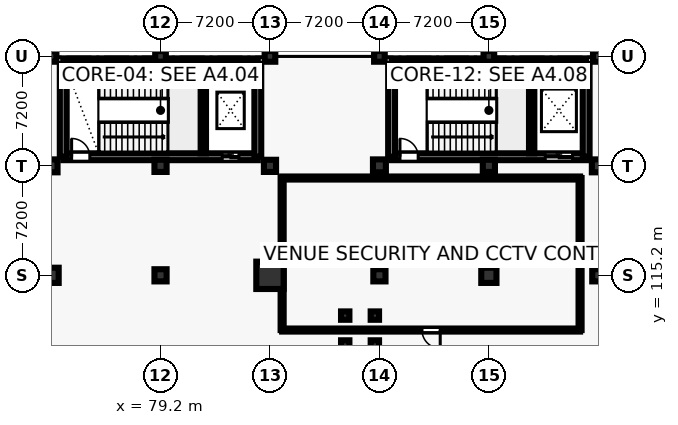
"""IFC4 building model, lengths in metres.
Left out: names, types, materials, properties, quantities, classifications, styles, units other than length and angle.
Written with IfcOpenShell. Run it as: python <this file> out.ifc"""

import sys

from ifc_helpers import new_model, si_unit, direction, frame, frame_2d, origin, origin_2d, place, context, subcontext, project, spatial, rectangle, circle, extrude, element, fill, save


model = new_model("IFC4")
c1 = context("Model", 3, precision=1e-05, world=origin(), true_north=direction((0.0, 1.0)))
c2 = subcontext(c1, "Body", "Model", "MODEL_VIEW")
j1 = project(units=[si_unit("LENGTHUNIT", "METRE"), si_unit("PLANEANGLEUNIT", "RADIAN")], contexts=[c1])
p1 = place(None, origin())
s1 = spatial("IfcSite", under=j1, at=p1, CompositionType="ELEMENT")
p2 = place(p1, origin())
s2 = spatial("IfcBuilding", under=s1, at=p2, CompositionType="ELEMENT")
p3 = place(p2, frame((0.0, 0.0, 5.4)))
s3 = spatial("IfcBuildingStorey", under=s2, at=p3, CompositionType="ELEMENT", Elevation=5.4)
p4 = place(p3, frame((72.0, 115.2, 0.0), z_axis=(0.0, 0.0, 1.0), x_axis=(1.0, 0.0, 0.0)))
e1 = element("IfcColumn", 1, at=p4, inside=s3, PredefinedType="COLUMN", context=c2, shape_type="SweptSolid", body=[
    extrude(circle(Radius=0.5, at=origin_2d()), origin(), (0.0, 0.0, 1.0), 4.2),
])
p5 = place(p3, frame((72.0, 122.4, 0.0), z_axis=(0.0, 0.0, 1.0), x_axis=(1.0, 0.0, 0.0)))
e2 = element("IfcColumn", 2, at=p5, inside=s3, PredefinedType="COLUMN", context=c2, shape_type="SweptSolid", body=[
    extrude(rectangle(XDim=0.85, YDim=0.85, at=origin_2d()), origin(), (0.0, 0.0, 1.0), 4.2),
])
p6 = place(p3, frame((72.0, 129.6, 0.0), z_axis=(0.0, 0.0, 1.0), x_axis=(1.0, 0.0, 0.0)))
e3 = element("IfcColumn", 3, at=p6, inside=s3, PredefinedType="COLUMN", context=c2, shape_type="SweptSolid", body=[
    extrude(rectangle(XDim=0.7, YDim=0.7, at=origin_2d()), origin(), (0.0, 0.0, 1.0), 4.2),
])
p7 = place(p3, frame((79.2, 115.2, 0.0), z_axis=(0.0, 0.0, 1.0), x_axis=(1.0, 0.0, 0.0)))
e4 = element("IfcColumn", 4, at=p7, inside=s3, PredefinedType="COLUMN", context=c2, shape_type="SweptSolid", body=[
    extrude(rectangle(XDim=0.8, YDim=0.8, at=origin_2d()), origin(), (0.0, 0.0, 1.0), 4.2),
])
p8 = place(p3, frame((79.2, 122.4, 0.0), z_axis=(0.0, 0.0, 1.0), x_axis=(1.0, 0.0, 0.0)))
e5 = element("IfcColumn", 5, at=p8, inside=s3, PredefinedType="COLUMN", context=c2, shape_type="SweptSolid", body=[
    extrude(circle(Radius=0.4, at=origin_2d()), origin(), (0.0, 0.0, 1.0), 4.2),
])
p9 = place(p3, frame((79.2, 129.6, 0.0), z_axis=(0.0, 0.0, 1.0), x_axis=(1.0, 0.0, 0.0)))
e6 = element("IfcColumn", 6, at=p9, inside=s3, PredefinedType="COLUMN", context=c2, shape_type="SweptSolid", body=[
    extrude(rectangle(XDim=0.7, YDim=0.7, at=origin_2d()), origin(), (0.0, 0.0, 1.0), 4.2),
])
p10 = place(p3, frame((86.4, 115.2, 0.0), z_axis=(0.0, 0.0, 1.0), x_axis=(1.0, 0.0, 0.0)))
e7 = element("IfcColumn", 7, at=p10, inside=s3, PredefinedType="COLUMN", context=c2, shape_type="SweptSolid", body=[
    extrude(circle(Radius=0.9, at=origin_2d()), origin(), (0.0, 0.0, 1.0), 4.2),
])
p11 = place(p3, frame((86.4, 122.4, 0.0), z_axis=(0.0, 0.0, 1.0), x_axis=(1.0, 0.0, 0.0)))
e8 = element("IfcColumn", 8, at=p11, inside=s3, PredefinedType="COLUMN", context=c2, shape_type="SweptSolid", body=[
    extrude(rectangle(XDim=0.8, YDim=0.8, at=origin_2d()), origin(), (0.0, 0.0, 1.0), 4.2),
])
p12 = place(p3, frame((86.4, 129.6, 0.0), z_axis=(0.0, 0.0, 1.0), x_axis=(1.0, 0.0, 0.0)))
e9 = element("IfcColumn", 9, at=p12, inside=s3, PredefinedType="COLUMN", context=c2, shape_type="SweptSolid", body=[
    extrude(rectangle(XDim=0.7, YDim=0.7, at=origin_2d()), origin(), (0.0, 0.0, 1.0), 4.2),
])
p13 = place(p3, frame((93.6, 115.2, 0.0), z_axis=(0.0, 0.0, 1.0), x_axis=(1.0, 0.0, 0.0)))
e10 = element("IfcColumn", 10, at=p13, inside=s3, PredefinedType="COLUMN", context=c2, shape_type="SweptSolid", body=[
    extrude(circle(Radius=0.4, at=origin_2d()), origin(), (0.0, 0.0, 1.0), 4.2),
])
p14 = place(p3, frame((93.6, 122.4, 0.0), z_axis=(0.0, 0.0, 1.0), x_axis=(1.0, 0.0, 0.0)))
e11 = element("IfcColumn", 11, at=p14, inside=s3, PredefinedType="COLUMN", context=c2, shape_type="SweptSolid", body=[
    extrude(rectangle(XDim=0.85, YDim=0.85, at=origin_2d()), origin(), (0.0, 0.0, 1.0), 4.2),
])
p15 = place(p3, frame((93.6, 129.6, 0.0), z_axis=(0.0, 0.0, 1.0), x_axis=(1.0, 0.0, 0.0)))
e12 = element("IfcColumn", 12, at=p15, inside=s3, PredefinedType="COLUMN", context=c2, shape_type="SweptSolid", body=[
    extrude(rectangle(XDim=0.7, YDim=0.7, at=origin_2d()), origin(), (0.0, 0.0, 1.0), 4.2),
])
p16 = place(p3, frame((100.8, 115.2, 0.0), z_axis=(0.0, 0.0, 1.0), x_axis=(1.0, 0.0, 0.0)))
e13 = element("IfcColumn", 13, at=p16, inside=s3, PredefinedType="COLUMN", context=c2, shape_type="SweptSolid", body=[
    extrude(circle(Radius=0.5, at=origin_2d()), origin(), (0.0, 0.0, 1.0), 4.2),
])
p17 = place(p3, frame((100.8, 122.4, 0.0), z_axis=(0.0, 0.0, 1.0), x_axis=(1.0, 0.0, 0.0)))
e14 = element("IfcColumn", 14, at=p17, inside=s3, PredefinedType="COLUMN", context=c2, shape_type="SweptSolid", body=[
    extrude(circle(Radius=0.4, at=origin_2d()), origin(), (0.0, 0.0, 1.0), 4.2),
])
p18 = place(p3, frame((100.8, 129.6, 0.0), z_axis=(0.0, 0.0, 1.0), x_axis=(1.0, 0.0, 0.0)))
e15 = element("IfcColumn", 15, at=p18, inside=s3, PredefinedType="COLUMN", context=c2, shape_type="SweptSolid", body=[
    extrude(rectangle(XDim=0.7, YDim=0.7, at=origin_2d()), origin(), (0.0, 0.0, 1.0), 4.2),
])
p19 = place(p3, frame((108.0, 115.2, 0.0), z_axis=(0.0, 0.0, 1.0), x_axis=(1.0, 0.0, 0.0)))
e16 = element("IfcColumn", 16, at=p19, inside=s3, PredefinedType="COLUMN", context=c2, shape_type="SweptSolid", body=[
    extrude(circle(Radius=0.4, at=origin_2d()), origin(), (0.0, 0.0, 1.0), 4.2),
])
p20 = place(p3, frame((108.0, 122.4, 0.0), z_axis=(0.0, 0.0, 1.0), x_axis=(1.0, 0.0, 0.0)))
e17 = element("IfcColumn", 17, at=p20, inside=s3, PredefinedType="COLUMN", context=c2, shape_type="SweptSolid", body=[
    extrude(rectangle(XDim=0.85, YDim=0.85, at=origin_2d()), origin(), (0.0, 0.0, 1.0), 4.2),
])
p21 = place(p3, frame((108.0, 129.6, 0.0), z_axis=(0.0, 0.0, 1.0), x_axis=(1.0, 0.0, 0.0)))
e18 = element("IfcColumn", 18, at=p21, inside=s3, PredefinedType="COLUMN", context=c2, shape_type="SweptSolid", body=[
    extrude(rectangle(XDim=0.7, YDim=0.7, at=origin_2d()), origin(), (0.0, 0.0, 1.0), 4.2),
])
p22 = place(p3, frame((72.8, 123.0, 0.0), z_axis=(0.0, 0.0, 1.0), x_axis=(1.0, 0.0, 0.0)))
e19 = element("IfcWall", 19, at=p22, inside=s3, PredefinedType="SHEAR", context=c2, shape_type="SweptSolid", body=[
    extrude(rectangle(XDim=12.8, YDim=0.45, at=frame_2d((6.4, 0.0))), origin(), (0.0, 0.0, 1.0), 3.92),
])
p23 = place(p22, frame((0.55, 0.0, 0.0)))
e20 = element("IfcOpeningElement", 20, at=p23, cuts=e19, PredefinedType="OPENING", context=c2, shape_type="SweptSolid", body=[
    extrude(rectangle(XDim=1.2, YDim=2.25, at=frame_2d((0.6, 1.125))), frame((0.0, 0.235, 0.0), z_axis=(0.0, -1.0, 0.0), x_axis=(1.0, 0.0, 0.0)), (0.0, 0.0, 1.0), 0.47),
])
p24 = place(p22, frame((10.458, 0.0, 0.0)))
e21 = element("IfcOpeningElement", 21, at=p24, cuts=e19, PredefinedType="OPENING", context=c2, shape_type="SweptSolid", body=[
    extrude(rectangle(XDim=1.1, YDim=2.2, at=frame_2d((0.55, 1.1))), frame((0.0, 0.235, 0.0), z_axis=(0.0, -1.0, 0.0), x_axis=(1.0, 0.0, 0.0)), (0.0, 0.0, 1.0), 0.47),
])
p25 = place(p3, frame((72.8, 129.1, 0.0), z_axis=(0.0, 0.0, 1.0), x_axis=(1.0, 0.0, 0.0)))
e22 = element("IfcWall", 22, at=p25, inside=s3, PredefinedType="SHEAR", context=c2, shape_type="SweptSolid", body=[
    extrude(rectangle(XDim=12.8, YDim=0.45, at=frame_2d((6.4, 0.0))), origin(), (0.0, 0.0, 1.0), 3.92),
])
for number, where, z_axis, x_axis in (
    (23, (72.8, 123.0, 0.0), (0.0, 0.0, 1.0), (0.0, 1.0, 0.0)),
    (24, (85.6, 123.0, 0.0), (0.0, 0.0, 1.0), (0.0, 1.0, 0.0)),
):
    element("IfcWall", number, at=place(p3, frame(where, z_axis=z_axis, x_axis=x_axis)), inside=s3, PredefinedType="SHEAR", context=c2, shape_type="SweptSolid", body=[
        extrude(rectangle(XDim=6.1, YDim=0.45, at=frame_2d((3.05, 0.0))), origin(), (0.0, 0.0, 1.0), 3.92),
    ])
p26 = place(p3, frame((82.016, 123.225, 0.0), z_axis=(0.0, 0.0, 1.0), x_axis=(0.0, 1.0, 0.0)))
e25 = element("IfcWall", 25, at=p26, inside=s3, PredefinedType="SHEAR", context=c2, shape_type="SweptSolid", body=[
    extrude(rectangle(XDim=5.65, YDim=0.35, at=frame_2d((2.825, 0.0))), origin(), (0.0, 0.0, 1.0), 3.92),
])
p27 = place(p3, frame((94.4, 123.0, 0.0), z_axis=(0.0, 0.0, 1.0), x_axis=(1.0, 0.0, 0.0)))
e26 = element("IfcWall", 26, at=p27, inside=s3, PredefinedType="SHEAR", context=c2, shape_type="SweptSolid", body=[
    extrude(rectangle(XDim=12.8, YDim=0.45, at=frame_2d((6.4, 0.0))), origin(), (0.0, 0.0, 1.0), 3.92),
])
p28 = place(p27, frame((0.55, 0.0, 0.0)))
e27 = element("IfcOpeningElement", 27, at=p28, cuts=e26, PredefinedType="OPENING", context=c2, shape_type="SweptSolid", body=[
    extrude(rectangle(XDim=1.2, YDim=2.25, at=frame_2d((0.6, 1.125))), frame((0.0, 0.235, 0.0), z_axis=(0.0, -1.0, 0.0), x_axis=(1.0, 0.0, 0.0)), (0.0, 0.0, 1.0), 0.47),
])
p29 = place(p27, frame((10.108, 0.0, 0.0)))
e28 = element("IfcOpeningElement", 28, at=p29, cuts=e26, PredefinedType="OPENING", context=c2, shape_type="SweptSolid", body=[
    extrude(rectangle(XDim=1.8, YDim=2.4, at=frame_2d((0.9, 1.2))), frame((0.0, 0.235, 0.0), z_axis=(0.0, -1.0, 0.0), x_axis=(1.0, 0.0, 0.0)), (0.0, 0.0, 1.0), 0.47),
])
p30 = place(p3, frame((94.4, 129.1, 0.0), z_axis=(0.0, 0.0, 1.0), x_axis=(1.0, 0.0, 0.0)))
e29 = element("IfcWall", 29, at=p30, inside=s3, PredefinedType="SHEAR", context=c2, shape_type="SweptSolid", body=[
    extrude(rectangle(XDim=12.8, YDim=0.45, at=frame_2d((6.4, 0.0))), origin(), (0.0, 0.0, 1.0), 3.92),
])
for number, where, z_axis, x_axis in (
    (30, (94.4, 123.0, 0.0), (0.0, 0.0, 1.0), (0.0, 1.0, 0.0)),
    (31, (107.2, 123.0, 0.0), (0.0, 0.0, 1.0), (0.0, 1.0, 0.0)),
):
    element("IfcWall", number, at=place(p3, frame(where, z_axis=z_axis, x_axis=x_axis)), inside=s3, PredefinedType="SHEAR", context=c2, shape_type="SweptSolid", body=[
        extrude(rectangle(XDim=6.1, YDim=0.45, at=frame_2d((3.05, 0.0))), origin(), (0.0, 0.0, 1.0), 3.92),
    ])
p31 = place(p3, frame((103.616, 123.225, 0.0), z_axis=(0.0, 0.0, 1.0), x_axis=(0.0, 1.0, 0.0)))
e32 = element("IfcWall", 32, at=p31, inside=s3, PredefinedType="SHEAR", context=c2, shape_type="SweptSolid", body=[
    extrude(rectangle(XDim=5.65, YDim=0.35, at=frame_2d((2.825, 0.0))), origin(), (0.0, 0.0, 1.0), 3.92),
])
for number, where, z_axis, x_axis in (
    (33, (91.35, 110.65, 0.0), (0.0, 0.0, 1.0), (1.0, 0.0, 0.0)),
    (34, (93.3, 110.65, 0.0), (0.0, 0.0, 1.0), (1.0, 0.0, 0.0)),
    (35, (91.35, 112.55, 0.0), (0.0, 0.0, 1.0), (1.0, 0.0, 0.0)),
    (36, (93.3, 112.55, 0.0), (0.0, 0.0, 1.0), (1.0, 0.0, 0.0)),
):
    element("IfcColumn", number, at=place(p3, frame(where, z_axis=z_axis, x_axis=x_axis)), inside=s3, PredefinedType="COLUMN", context=c2, shape_type="SweptSolid", body=[
        extrude(rectangle(XDim=0.55, YDim=0.55, at=origin_2d()), origin(), (0.0, 0.0, 1.0), 4.2),
    ])
p32 = place(p3, frame((87.2, 111.6, 0.0), z_axis=(0.0, 0.0, 1.0), x_axis=(1.0, 0.0, 0.0)))
e37 = element("IfcWall", 37, at=p32, inside=s3, PredefinedType="PARTITIONING", context=c2, shape_type="SweptSolid", body=[
    extrude(rectangle(XDim=19.6, YDim=0.2, at=frame_2d((9.8, 0.0))), origin(), (0.0, 0.0, 1.0), 2.98),
])
p33 = place(p32, frame((9.2, 0.0, 0.0)))
e38 = element("IfcOpeningElement", 38, at=p33, cuts=e37, PredefinedType="OPENING", context=c2, shape_type="SweptSolid", body=[
    extrude(rectangle(XDim=1.2, YDim=2.25, at=frame_2d((0.6, 1.125))), frame((0.0, 0.11, 0.0), z_axis=(0.0, -1.0, 0.0), x_axis=(1.0, 0.0, 0.0)), (0.0, 0.0, 1.0), 0.22),
])
p34 = place(p3, frame((106.8, 111.6, 0.0), z_axis=(0.0, 0.0, 1.0), x_axis=(0.0, 1.0, 0.0)))
e39 = element("IfcWall", 39, at=p34, inside=s3, PredefinedType="PARTITIONING", context=c2, shape_type="SweptSolid", body=[
    extrude(rectangle(XDim=10.0, YDim=0.2, at=frame_2d((5.0, 0.0))), origin(), (0.0, 0.0, 1.0), 2.98),
])
p35 = place(p3, frame((106.8, 121.6, 0.0), z_axis=(0.0, 0.0, 1.0), x_axis=(-1.0, 0.0, 0.0)))
e40 = element("IfcWall", 40, at=p35, inside=s3, PredefinedType="PARTITIONING", context=c2, shape_type="SweptSolid", body=[
    extrude(rectangle(XDim=19.6, YDim=0.2, at=frame_2d((9.8, 0.0))), origin(), (0.0, 0.0, 1.0), 2.98),
])
p36 = place(p3, frame((87.2, 121.6, 0.0), z_axis=(0.0, 0.0, 1.0), x_axis=(0.0, -1.0, 0.0)))
e41 = element("IfcWall", 41, at=p36, inside=s3, PredefinedType="PARTITIONING", context=c2, shape_type="SweptSolid", body=[
    extrude(rectangle(XDim=10.0, YDim=0.2, at=frame_2d((5.0, 0.0))), origin(), (0.0, 0.0, 1.0), 2.98),
])
p37 = place(p23, origin())
e42 = element("IfcDoor", 42, at=p37, inside=s3, OperationType="SINGLE_SWING_LEFT", PredefinedType="DOOR", context=c2, shape_type="SweptSolid", body=[
    extrude(rectangle(XDim=1.2, YDim=2.25, at=frame_2d((0.6, 1.125))), frame((0.0, 0.025, 0.0), z_axis=(0.0, -1.0, 0.0), x_axis=(1.0, 0.0, 0.0)), (0.0, 0.0, 1.0), 0.05),
])
fill(e20, e42)
p38 = place(p24, origin())
e43 = element("IfcDoor", 43, at=p38, inside=s3, OperationType="SLIDING_TO_LEFT", PredefinedType="DOOR", context=c2, shape_type="SweptSolid", body=[
    extrude(rectangle(XDim=1.1, YDim=2.2, at=frame_2d((0.55, 1.1))), frame((0.0, 0.025, 0.0), z_axis=(0.0, -1.0, 0.0), x_axis=(1.0, 0.0, 0.0)), (0.0, 0.0, 1.0), 0.05),
])
fill(e21, e43)
p39 = place(p28, origin())
e44 = element("IfcDoor", 44, at=p39, inside=s3, OperationType="SINGLE_SWING_LEFT", PredefinedType="DOOR", context=c2, shape_type="SweptSolid", body=[
    extrude(rectangle(XDim=1.2, YDim=2.25, at=frame_2d((0.6, 1.125))), frame((0.0, 0.025, 0.0), z_axis=(0.0, -1.0, 0.0), x_axis=(1.0, 0.0, 0.0)), (0.0, 0.0, 1.0), 0.05),
])
fill(e27, e44)
p40 = place(p29, origin())
e45 = element("IfcDoor", 45, at=p40, inside=s3, OperationType="SLIDING_TO_RIGHT", PredefinedType="DOOR", context=c2, shape_type="SweptSolid", body=[
    extrude(rectangle(XDim=1.8, YDim=2.4, at=frame_2d((0.9, 1.2))), frame((0.0, 0.025, 0.0), z_axis=(0.0, -1.0, 0.0), x_axis=(1.0, 0.0, 0.0)), (0.0, 0.0, 1.0), 0.05),
])
fill(e28, e45)
p41 = place(p33, frame((1.2, 0.0, 0.0), z_axis=(0.0, 0.0, 1.0), x_axis=(-1.0, 0.0, 0.0)))
e46 = element("IfcDoor", 46, at=p41, inside=s3, OperationType="SINGLE_SWING_RIGHT", PredefinedType="DOOR", context=c2, shape_type="SweptSolid", body=[
    extrude(rectangle(XDim=1.2, YDim=2.25, at=frame_2d((0.6, 1.125))), frame((0.0, 0.025, 0.0), z_axis=(0.0, -1.0, 0.0), x_axis=(1.0, 0.0, 0.0)), (0.0, 0.0, 1.0), 0.05),
])
fill(e38, e46)
save(model, sys.argv[1])
